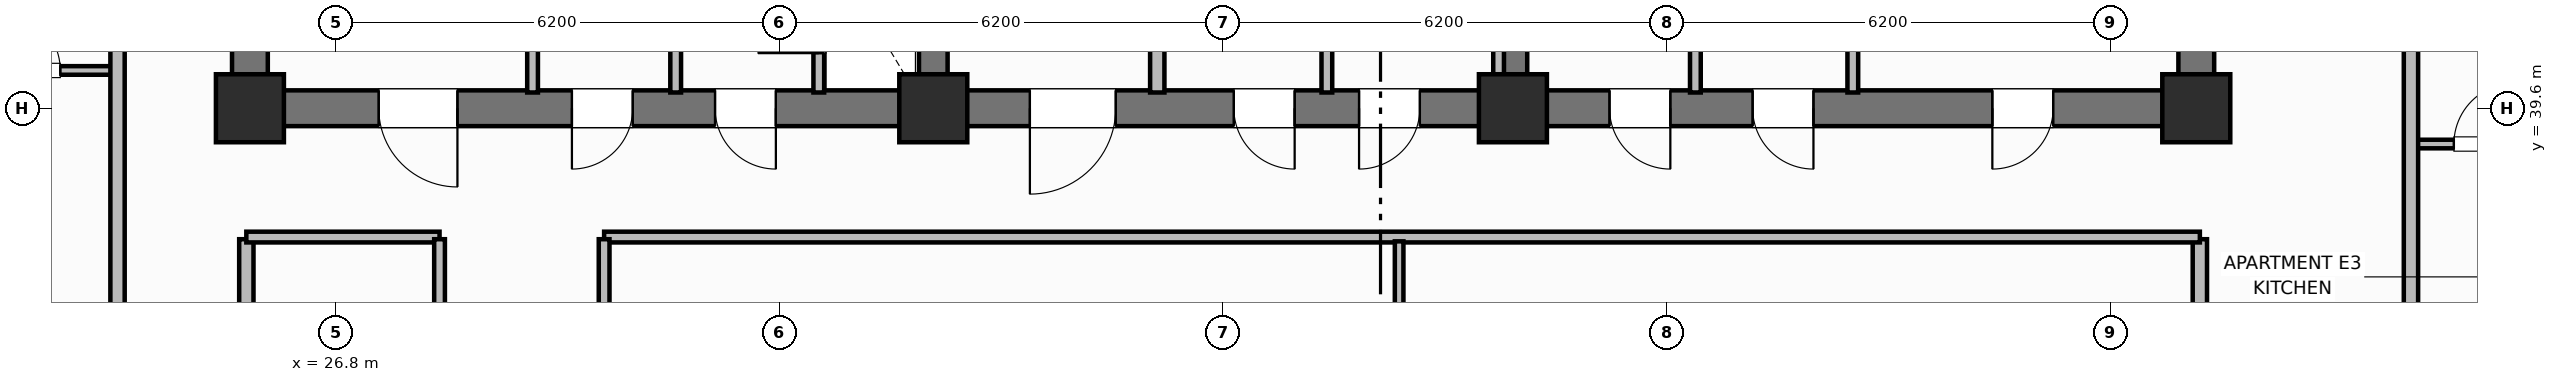
"""IFC4 building model, lengths in metres.
Left out: names, types, materials, properties, quantities, classifications, styles, units other than length and angle.
Written with IfcOpenShell. Run it as: python <this file> out.ifc"""

import sys

from ifc_helpers import new_model, si_unit, direction, frame, frame_2d, origin, origin_2d, place, context, subcontext, project, spatial, rectangle, extrude, element, fill, save


model = new_model("IFC4")
c1 = context("Model", 3, precision=1e-05, world=origin(), true_north=direction((0.0, 1.0)))
c2 = subcontext(c1, "Body", "Model", "MODEL_VIEW")
j1 = project(units=[si_unit("LENGTHUNIT", "METRE"), si_unit("PLANEANGLEUNIT", "RADIAN")], contexts=[c1])
p1 = place(None, origin())
s1 = spatial("IfcSite", under=j1, at=p1, CompositionType="ELEMENT")
p2 = place(p1, origin())
s2 = spatial("IfcBuilding", under=s1, at=p2, CompositionType="ELEMENT")
p3 = place(p2, frame((0.0, 0.0, 192.2)))
s3 = spatial("IfcBuildingStorey", under=s2, at=p3, CompositionType="ELEMENT", Elevation=192.2)
for number, where, z_axis, x_axis in (
    (1, (25.6, 39.85, 0.0), (0.0, 0.0, 1.0), (0.0, 1.0, 0.0)),
    (2, (52.8, 39.85, 0.0), (0.0, 0.0, 1.0), (0.0, 1.0, 0.0)),
):
    element("IfcWall", number, at=place(p3, frame(where, z_axis=z_axis, x_axis=x_axis)), inside=s3, PredefinedType="SHEAR", context=c2, shape_type="SweptSolid", body=[
        extrude(rectangle(XDim=5.7, YDim=0.5, at=frame_2d((2.85, 0.0))), origin(), (0.0, 0.0, 1.0), 3.7),
    ])
p4 = place(p3, frame((52.8, 39.6, 0.0), z_axis=(0.0, 0.0, 1.0), x_axis=(-1.0, 0.0, 0.0)))
e3 = element("IfcWall", 3, at=p4, inside=s3, PredefinedType="SHEAR", context=c2, shape_type="SweptSolid", body=[
    extrude(rectangle(XDim=27.2, YDim=0.5, at=frame_2d((13.6, 0.0))), origin(), (0.0, 0.0, 1.0), 3.7),
])
p5 = place(p4, frame((24.3, 0.0, 0.0)))
e4 = element("IfcOpeningElement", 4, at=p5, cuts=e3, PredefinedType="OPENING", context=c2, shape_type="SweptSolid", body=[
    extrude(rectangle(XDim=1.1, YDim=2.15, at=frame_2d((0.55, 1.075))), frame((0.0, 0.26, 0.0), z_axis=(0.0, -1.0, 0.0), x_axis=(1.0, 0.0, 0.0)), (0.0, 0.0, 1.0), 0.52),
])
p6 = place(p4, frame((21.85, 0.0, 0.0)))
e5 = element("IfcOpeningElement", 5, at=p6, cuts=e3, PredefinedType="OPENING", context=c2, shape_type="SweptSolid", body=[
    extrude(rectangle(XDim=0.85, YDim=2.1, at=frame_2d((0.425, 1.05))), frame((0.0, 0.26, 0.0), z_axis=(0.0, -1.0, 0.0), x_axis=(1.0, 0.0, 0.0)), (0.0, 0.0, 1.0), 0.52),
])
p7 = place(p4, frame((19.85, 0.0, 0.0)))
e6 = element("IfcOpeningElement", 6, at=p7, cuts=e3, PredefinedType="OPENING", context=c2, shape_type="SweptSolid", body=[
    extrude(rectangle(XDim=0.85, YDim=2.1, at=frame_2d((0.425, 1.05))), frame((0.0, 0.26, 0.0), z_axis=(0.0, -1.0, 0.0), x_axis=(1.0, 0.0, 0.0)), (0.0, 0.0, 1.0), 0.52),
])
p8 = place(p4, frame((15.1, 0.0, 0.0)))
e7 = element("IfcOpeningElement", 7, at=p8, cuts=e3, PredefinedType="OPENING", context=c2, shape_type="SweptSolid", body=[
    extrude(rectangle(XDim=1.2, YDim=2.15, at=frame_2d((0.6, 1.075))), frame((0.0, 0.26, 0.0), z_axis=(0.0, -1.0, 0.0), x_axis=(1.0, 0.0, 0.0)), (0.0, 0.0, 1.0), 0.52),
])
p9 = place(p4, frame((12.6, 0.0, 0.0)))
e8 = element("IfcOpeningElement", 8, at=p9, cuts=e3, PredefinedType="OPENING", context=c2, shape_type="SweptSolid", body=[
    extrude(rectangle(XDim=0.85, YDim=2.1, at=frame_2d((0.425, 1.05))), frame((0.0, 0.26, 0.0), z_axis=(0.0, -1.0, 0.0), x_axis=(1.0, 0.0, 0.0)), (0.0, 0.0, 1.0), 0.52),
])
p10 = place(p4, frame((10.85, 0.0, 0.0)))
e9 = element("IfcOpeningElement", 9, at=p10, cuts=e3, PredefinedType="OPENING", context=c2, shape_type="SweptSolid", body=[
    extrude(rectangle(XDim=0.85, YDim=2.1, at=frame_2d((0.425, 1.05))), frame((0.0, 0.26, 0.0), z_axis=(0.0, -1.0, 0.0), x_axis=(1.0, 0.0, 0.0)), (0.0, 0.0, 1.0), 0.52),
])
p11 = place(p4, frame((7.35, 0.0, 0.0)))
e10 = element("IfcOpeningElement", 10, at=p11, cuts=e3, PredefinedType="OPENING", context=c2, shape_type="SweptSolid", body=[
    extrude(rectangle(XDim=0.85, YDim=2.1, at=frame_2d((0.425, 1.05))), frame((0.0, 0.26, 0.0), z_axis=(0.0, -1.0, 0.0), x_axis=(1.0, 0.0, 0.0)), (0.0, 0.0, 1.0), 0.52),
])
p12 = place(p4, frame((5.35, 0.0, 0.0)))
e11 = element("IfcOpeningElement", 11, at=p12, cuts=e3, PredefinedType="OPENING", context=c2, shape_type="SweptSolid", body=[
    extrude(rectangle(XDim=0.85, YDim=2.1, at=frame_2d((0.425, 1.05))), frame((0.0, 0.26, 0.0), z_axis=(0.0, -1.0, 0.0), x_axis=(1.0, 0.0, 0.0)), (0.0, 0.0, 1.0), 0.52),
])
p13 = place(p4, frame((2.0, 0.0, 0.0)))
e12 = element("IfcOpeningElement", 12, at=p13, cuts=e3, PredefinedType="OPENING", context=c2, shape_type="SweptSolid", body=[
    extrude(rectangle(XDim=0.85, YDim=2.1, at=frame_2d((0.425, 1.05))), frame((0.0, 0.26, 0.0), z_axis=(0.0, -1.0, 0.0), x_axis=(1.0, 0.0, 0.0)), (0.0, 0.0, 1.0), 0.52),
])
for number, where, z_axis, x_axis in (
    (13, (35.15, 39.85, 0.0), (0.0, 0.0, 1.0), (0.0, 1.0, 0.0)),
    (14, (43.25, 39.85, 0.0), (0.0, 0.0, 1.0), (0.0, 1.0, 0.0)),
):
    element("IfcWall", number, at=place(p3, frame(where, z_axis=z_axis, x_axis=x_axis)), inside=s3, PredefinedType="SHEAR", context=c2, shape_type="SweptSolid", body=[
        extrude(rectangle(XDim=5.7, YDim=0.4, at=frame_2d((2.85, 0.0))), origin(), (0.0, 0.0, 1.0), 3.7),
    ])
for number, where, z_axis, x_axis in (
    (15, (25.6, 39.6, 0.0), (0.0, 0.0, 1.0), (1.0, 0.0, 0.0)),
    (16, (35.15, 39.6, 0.0), (0.0, 0.0, 1.0), (1.0, 0.0, 0.0)),
    (17, (43.25, 39.6, 0.0), (0.0, 0.0, 1.0), (1.0, 0.0, 0.0)),
    (18, (52.8, 39.6, 0.0), (0.0, 0.0, 1.0), (1.0, 0.0, 0.0)),
):
    element("IfcColumn", number, at=place(p3, frame(where, z_axis=z_axis, x_axis=x_axis)), inside=s3, PredefinedType="COLUMN", context=c2, shape_type="SweptSolid", body=[
        extrude(rectangle(XDim=0.95, YDim=0.95, at=origin_2d()), origin(), (0.0, 0.0, 1.0), 3.7),
    ])
p14 = place(p3, frame((33.55, 39.82, 0.0), z_axis=(0.0, 0.0, 1.0), x_axis=(0.0, 1.0, 0.0)))
e19 = element("IfcWall", 19, at=p14, inside=s3, PredefinedType="PARTITIONING", context=c2, shape_type="SweptSolid", body=[
    extrude(rectangle(XDim=2.13, YDim=0.15, at=frame_2d((1.065, 0.0))), origin(), (0.0, 0.0, 1.0), 2.49),
])
p15 = place(p14, frame((0.55, 0.0, 0.0)))
e20 = element("IfcOpeningElement", 20, at=p15, cuts=e19, PredefinedType="OPENING", context=c2, shape_type="SweptSolid", body=[
    extrude(rectangle(XDim=0.85, YDim=2.05, at=frame_2d((0.425, 1.025))), frame((0.0, 0.085, 0.0), z_axis=(0.0, -1.0, 0.0), x_axis=(1.0, 0.0, 0.0)), (0.0, 0.0, 1.0), 0.17),
])
for number, where, z_axis, x_axis in (
    (21, (29.55, 39.82, 0.0), (0.0, 0.0, 1.0), (0.0, 1.0, 0.0)),
    (22, (31.55, 39.82, 0.0), (0.0, 0.0, 1.0), (0.0, 1.0, 0.0)),
):
    element("IfcWall", number, at=place(p3, frame(where, z_axis=z_axis, x_axis=x_axis)), inside=s3, PredefinedType="PARTITIONING", context=c2, shape_type="SweptSolid", body=[
        extrude(rectangle(XDim=2.13, YDim=0.15, at=frame_2d((1.065, 0.0))), origin(), (0.0, 0.0, 1.0), 2.49),
    ])
p16 = place(p3, frame((38.28, 39.82, 0.0), z_axis=(0.0, 0.0, 1.0), x_axis=(0.0, 1.0, 0.0)))
e23 = element("IfcWall", 23, at=p16, inside=s3, PredefinedType="PARTITIONING", context=c2, shape_type="SweptSolid", body=[
    extrude(rectangle(XDim=5.63, YDim=0.2, at=frame_2d((2.815, 0.0))), origin(), (0.0, 0.0, 1.0), 2.49),
])
for number, where, z_axis, x_axis in (
    (24, (43.05, 39.82, 0.0), (0.0, 0.0, 1.0), (0.0, 1.0, 0.0)),
    (25, (40.65, 39.82, 0.0), (0.0, 0.0, 1.0), (0.0, 1.0, 0.0)),
    (26, (45.8, 39.82, 0.0), (0.0, 0.0, 1.0), (0.0, 1.0, 0.0)),
):
    element("IfcWall", number, at=place(p3, frame(where, z_axis=z_axis, x_axis=x_axis)), inside=s3, PredefinedType="PARTITIONING", context=c2, shape_type="SweptSolid", body=[
        extrude(rectangle(XDim=5.63, YDim=0.15, at=frame_2d((2.815, 0.0))), origin(), (0.0, 0.0, 1.0), 2.49),
    ])
p17 = place(p3, frame((48.0, 39.82, 0.0), z_axis=(0.0, 0.0, 1.0), x_axis=(0.0, 1.0, 0.0)))
e27 = element("IfcWall", 27, at=p17, inside=s3, PredefinedType="PARTITIONING", context=c2, shape_type="SweptSolid", body=[
    extrude(rectangle(XDim=2.73, YDim=0.15, at=frame_2d((1.365, 0.0))), origin(), (0.0, 0.0, 1.0), 2.49),
])
for number, where, z_axis, x_axis in (
    (28, (25.55, 18.63, 0.0), (0.0, 0.0, 1.0), (0.0, 1.0, 0.0)),
    (29, (52.85, 18.63, 0.0), (0.0, 0.0, 1.0), (0.0, 1.0, 0.0)),
):
    element("IfcWall", number, at=place(p3, frame(where, z_axis=z_axis, x_axis=x_axis)), inside=s3, PredefinedType="PARTITIONING", context=c2, shape_type="SweptSolid", body=[
        extrude(rectangle(XDim=19.14, YDim=0.2, at=frame_2d((9.57, 0.0))), origin(), (0.0, 0.0, 1.0), 2.49),
    ])
p18 = place(p3, frame((25.55, 37.8, 0.0), z_axis=(0.0, 0.0, 1.0), x_axis=(1.0, 0.0, 0.0)))
e30 = element("IfcWall", 30, at=p18, inside=s3, PredefinedType="PARTITIONING", context=c2, shape_type="SweptSolid", body=[
    extrude(rectangle(XDim=2.7, YDim=0.15, at=frame_2d((1.35, 0.0))), origin(), (0.0, 0.0, 1.0), 2.49),
])
p19 = place(p3, frame((30.55, 37.8, 0.0), z_axis=(0.0, 0.0, 1.0), x_axis=(1.0, 0.0, 0.0)))
e31 = element("IfcWall", 31, at=p19, inside=s3, PredefinedType="PARTITIONING", context=c2, shape_type="SweptSolid", body=[
    extrude(rectangle(XDim=22.3, YDim=0.15, at=frame_2d((11.15, 0.0))), origin(), (0.0, 0.0, 1.0), 2.49),
])
p20 = place(p3, frame((41.66, 25.56, 0.0), z_axis=(0.0, 0.0, 1.0), x_axis=(0.0, 1.0, 0.0)))
e32 = element("IfcWall", 32, at=p20, inside=s3, PredefinedType="PARTITIONING", context=c2, shape_type="SweptSolid", body=[
    extrude(rectangle(XDim=12.18, YDim=0.12, at=frame_2d((6.09, 0.0))), origin(), (0.0, 0.0, 1.0), 2.49),
])
p21 = place(p20, frame((2.0, 0.0, 0.0)))
e33 = element("IfcOpeningElement", 33, at=p21, cuts=e32, PredefinedType="OPENING", context=c2, shape_type="SweptSolid", body=[
    extrude(rectangle(XDim=0.9, YDim=2.1, at=frame_2d((0.45, 1.05))), frame((0.0, 0.07, 0.0), z_axis=(0.0, -1.0, 0.0), x_axis=(1.0, 0.0, 0.0)), (0.0, 0.0, 1.0), 0.14),
])
p22 = place(p3, frame((28.25, 18.63, 0.0), z_axis=(0.0, 0.0, 1.0), x_axis=(0.0, 1.0, 0.0)))
e34 = element("IfcWall", 34, at=p22, inside=s3, PredefinedType="PARTITIONING", context=c2, shape_type="SweptSolid", body=[
    extrude(rectangle(XDim=19.14, YDim=0.15, at=frame_2d((9.57, 0.0))), origin(), (0.0, 0.0, 1.0), 2.49),
])
p23 = place(p22, frame((3.0, 0.0, 0.0)))
e35 = element("IfcOpeningElement", 35, at=p23, cuts=e34, PredefinedType="OPENING", context=c2, shape_type="SweptSolid", body=[
    extrude(rectangle(XDim=0.9, YDim=2.1, at=frame_2d((0.45, 1.05))), frame((0.0, 0.085, 0.0), z_axis=(0.0, -1.0, 0.0), x_axis=(1.0, 0.0, 0.0)), (0.0, 0.0, 1.0), 0.17),
])
p24 = place(p22, frame((11.5, 0.0, 0.0)))
e36 = element("IfcOpeningElement", 36, at=p24, cuts=e34, PredefinedType="OPENING", context=c2, shape_type="SweptSolid", body=[
    extrude(rectangle(XDim=0.9, YDim=2.1, at=frame_2d((0.45, 1.05))), frame((0.0, 0.085, 0.0), z_axis=(0.0, -1.0, 0.0), x_axis=(1.0, 0.0, 0.0)), (0.0, 0.0, 1.0), 0.17),
])
p25 = place(p3, frame((30.55, 18.63, 0.0), z_axis=(0.0, 0.0, 1.0), x_axis=(0.0, 1.0, 0.0)))
e37 = element("IfcWall", 37, at=p25, inside=s3, PredefinedType="PARTITIONING", context=c2, shape_type="SweptSolid", body=[
    extrude(rectangle(XDim=19.14, YDim=0.15, at=frame_2d((9.57, 0.0))), origin(), (0.0, 0.0, 1.0), 2.49),
])
p26 = place(p25, frame((2.2, 0.0, 0.0)))
e38 = element("IfcOpeningElement", 38, at=p26, cuts=e37, PredefinedType="OPENING", context=c2, shape_type="SweptSolid", body=[
    extrude(rectangle(XDim=1.0, YDim=2.15, at=frame_2d((0.5, 1.075))), frame((0.0, 0.085, 0.0), z_axis=(0.0, -1.0, 0.0), x_axis=(1.0, 0.0, 0.0)), (0.0, 0.0, 1.0), 0.17),
])
p27 = place(p25, frame((8.89, 0.0, 0.0)))
e39 = element("IfcOpeningElement", 39, at=p27, cuts=e37, PredefinedType="OPENING", context=c2, shape_type="SweptSolid", body=[
    extrude(rectangle(XDim=1.0, YDim=2.15, at=frame_2d((0.5, 1.075))), frame((0.0, 0.085, 0.0), z_axis=(0.0, -1.0, 0.0), x_axis=(1.0, 0.0, 0.0)), (0.0, 0.0, 1.0), 0.17),
])
p28 = place(p3, frame((21.5, 40.128, 0.0), z_axis=(0.0, 0.0, 1.0), x_axis=(1.0, 0.0, 0.0)))
e40 = element("IfcWall", 40, at=p28, inside=s3, PredefinedType="PARTITIONING", context=c2, shape_type="SweptSolid", body=[
    extrude(rectangle(XDim=2.25, YDim=0.12, at=frame_2d((1.125, 0.0))), origin(), (0.0, 0.0, 1.0), 2.49),
])
p29 = place(p28, frame((0.6, 0.0, 0.0)))
e41 = element("IfcOpeningElement", 41, at=p29, cuts=e40, PredefinedType="OPENING", context=c2, shape_type="SweptSolid", body=[
    extrude(rectangle(XDim=0.85, YDim=2.1, at=frame_2d((0.425, 1.05))), frame((0.0, 0.07, 0.0), z_axis=(0.0, -1.0, 0.0), x_axis=(1.0, 0.0, 0.0)), (0.0, 0.0, 1.0), 0.14),
])
p30 = place(p3, frame((23.75, 10.6, 0.0), z_axis=(0.0, 0.0, 1.0), x_axis=(0.0, 1.0, 0.0)))
e42 = element("IfcWall", 42, at=p30, inside=s3, PredefinedType="PARTITIONING", context=c2, shape_type="SweptSolid", body=[
    extrude(rectangle(XDim=35.2, YDim=0.2, at=frame_2d((17.6, 0.0))), origin(), (0.0, 0.0, 1.0), 2.49),
])
p31 = place(p30, frame((2.65, 0.0, 0.0)))
e43 = element("IfcOpeningElement", 43, at=p31, cuts=e42, PredefinedType="OPENING", context=c2, shape_type="SweptSolid", body=[
    extrude(rectangle(XDim=1.0, YDim=2.15, at=frame_2d((0.5, 1.075))), frame((0.0, 0.11, 0.0), z_axis=(0.0, -1.0, 0.0), x_axis=(1.0, 0.0, 0.0)), (0.0, 0.0, 1.0), 0.22),
])
p32 = place(p30, frame((13.222, 0.0, 0.0)))
e44 = element("IfcOpeningElement", 44, at=p32, cuts=e42, PredefinedType="OPENING", context=c2, shape_type="SweptSolid", body=[
    extrude(rectangle(XDim=1.0, YDim=2.15, at=frame_2d((0.5, 1.075))), frame((0.0, 0.11, 0.0), z_axis=(0.0, -1.0, 0.0), x_axis=(1.0, 0.0, 0.0)), (0.0, 0.0, 1.0), 0.22),
])
p33 = place(p30, frame((24.838, 0.0, 0.0)))
e45 = element("IfcOpeningElement", 45, at=p33, cuts=e42, PredefinedType="OPENING", context=c2, shape_type="SweptSolid", body=[
    extrude(rectangle(XDim=1.0, YDim=2.15, at=frame_2d((0.5, 1.075))), frame((0.0, 0.11, 0.0), z_axis=(0.0, -1.0, 0.0), x_axis=(1.0, 0.0, 0.0)), (0.0, 0.0, 1.0), 0.22),
])
p34 = place(p3, frame((55.8, 39.1, 0.0), z_axis=(0.0, 0.0, 1.0), x_axis=(1.0, 0.0, 0.0)))
e46 = element("IfcWall", 46, at=p34, inside=s3, PredefinedType="PARTITIONING", context=c2, shape_type="SweptSolid", body=[
    extrude(rectangle(XDim=2.25, YDim=0.12, at=frame_2d((1.125, 0.0))), origin(), (0.0, 0.0, 1.0), 2.49),
])
p35 = place(p34, frame((0.6, 0.0, 0.0)))
e47 = element("IfcOpeningElement", 47, at=p35, cuts=e46, PredefinedType="OPENING", context=c2, shape_type="SweptSolid", body=[
    extrude(rectangle(XDim=0.85, YDim=2.1, at=frame_2d((0.425, 1.05))), frame((0.0, 0.07, 0.0), z_axis=(0.0, -1.0, 0.0), x_axis=(1.0, 0.0, 0.0)), (0.0, 0.0, 1.0), 0.14),
])
p36 = place(p3, frame((55.8, 10.6, 0.0), z_axis=(0.0, 0.0, 1.0), x_axis=(0.0, 1.0, 0.0)))
e48 = element("IfcWall", 48, at=p36, inside=s3, PredefinedType="PARTITIONING", context=c2, shape_type="SweptSolid", body=[
    extrude(rectangle(XDim=35.2, YDim=0.2, at=frame_2d((17.6, 0.0))), origin(), (0.0, 0.0, 1.0), 2.49),
])
p37 = place(p36, frame((2.65, 0.0, 0.0)))
e49 = element("IfcOpeningElement", 49, at=p37, cuts=e48, PredefinedType="OPENING", context=c2, shape_type="SweptSolid", body=[
    extrude(rectangle(XDim=1.0, YDim=2.15, at=frame_2d((0.5, 1.075))), frame((0.0, 0.11, 0.0), z_axis=(0.0, -1.0, 0.0), x_axis=(1.0, 0.0, 0.0)), (0.0, 0.0, 1.0), 0.22),
])
p38 = place(p36, frame((12.87, 0.0, 0.0)))
e50 = element("IfcOpeningElement", 50, at=p38, cuts=e48, PredefinedType="OPENING", context=c2, shape_type="SweptSolid", body=[
    extrude(rectangle(XDim=1.0, YDim=2.15, at=frame_2d((0.5, 1.075))), frame((0.0, 0.11, 0.0), z_axis=(0.0, -1.0, 0.0), x_axis=(1.0, 0.0, 0.0)), (0.0, 0.0, 1.0), 0.22),
])
p39 = place(p36, frame((23.65, 0.0, 0.0)))
e51 = element("IfcOpeningElement", 51, at=p39, cuts=e48, PredefinedType="OPENING", context=c2, shape_type="SweptSolid", body=[
    extrude(rectangle(XDim=1.0, YDim=2.15, at=frame_2d((0.5, 1.075))), frame((0.0, 0.11, 0.0), z_axis=(0.0, -1.0, 0.0), x_axis=(1.0, 0.0, 0.0)), (0.0, 0.0, 1.0), 0.22),
])
p40 = place(p15, origin())
e52 = element("IfcDoor", 52, at=p40, inside=s3, OperationType="SINGLE_SWING_LEFT", PredefinedType="TRAPDOOR", context=c2, shape_type="SweptSolid", body=[
    extrude(rectangle(XDim=0.85, YDim=2.05, at=frame_2d((0.425, 1.025))), frame((0.0, 0.025, 0.0), z_axis=(0.0, -1.0, 0.0), x_axis=(1.0, 0.0, 0.0)), (0.0, 0.0, 1.0), 0.05),
])
fill(e20, e52)
p41 = place(p29, origin())
e53 = element("IfcDoor", 53, at=p41, inside=s3, OperationType="SINGLE_SWING_LEFT", PredefinedType="DOOR", context=c2, shape_type="SweptSolid", body=[
    extrude(rectangle(XDim=0.85, YDim=2.1, at=frame_2d((0.425, 1.05))), frame((0.0, 0.025, 0.0), z_axis=(0.0, -1.0, 0.0), x_axis=(1.0, 0.0, 0.0)), (0.0, 0.0, 1.0), 0.05),
])
fill(e41, e53)
p42 = place(p35, origin())
e54 = element("IfcDoor", 54, at=p42, inside=s3, OperationType="SINGLE_SWING_RIGHT", PredefinedType="DOOR", context=c2, shape_type="SweptSolid", body=[
    extrude(rectangle(XDim=0.85, YDim=2.1, at=frame_2d((0.425, 1.05))), frame((0.0, 0.025, 0.0), z_axis=(0.0, -1.0, 0.0), x_axis=(1.0, 0.0, 0.0)), (0.0, 0.0, 1.0), 0.05),
])
fill(e47, e54)
p43 = place(p5, origin())
e55 = element("IfcDoor", 55, at=p43, inside=s3, OperationType="SINGLE_SWING_LEFT", PredefinedType="DOOR", context=c2, shape_type="SweptSolid", body=[
    extrude(rectangle(XDim=1.1, YDim=2.15, at=frame_2d((0.55, 1.075))), frame((0.0, 0.025, 0.0), z_axis=(0.0, -1.0, 0.0), x_axis=(1.0, 0.0, 0.0)), (0.0, 0.0, 1.0), 0.05),
])
fill(e4, e55)
p44 = place(p6, origin())
e56 = element("IfcDoor", 56, at=p44, inside=s3, OperationType="SINGLE_SWING_RIGHT", PredefinedType="DOOR", context=c2, shape_type="SweptSolid", body=[
    extrude(rectangle(XDim=0.85, YDim=2.1, at=frame_2d((0.425, 1.05))), frame((0.0, 0.025, 0.0), z_axis=(0.0, -1.0, 0.0), x_axis=(1.0, 0.0, 0.0)), (0.0, 0.0, 1.0), 0.05),
])
fill(e5, e56)
p45 = place(p7, origin())
e57 = element("IfcDoor", 57, at=p45, inside=s3, OperationType="SINGLE_SWING_LEFT", PredefinedType="DOOR", context=c2, shape_type="SweptSolid", body=[
    extrude(rectangle(XDim=0.85, YDim=2.1, at=frame_2d((0.425, 1.05))), frame((0.0, 0.025, 0.0), z_axis=(0.0, -1.0, 0.0), x_axis=(1.0, 0.0, 0.0)), (0.0, 0.0, 1.0), 0.05),
])
fill(e6, e57)
p46 = place(p8, origin())
e58 = element("IfcDoor", 58, at=p46, inside=s3, OperationType="SINGLE_SWING_RIGHT", PredefinedType="DOOR", context=c2, shape_type="SweptSolid", body=[
    extrude(rectangle(XDim=1.2, YDim=2.15, at=frame_2d((0.6, 1.075))), frame((0.0, 0.025, 0.0), z_axis=(0.0, -1.0, 0.0), x_axis=(1.0, 0.0, 0.0)), (0.0, 0.0, 1.0), 0.05),
])
fill(e7, e58)
p47 = place(p9, origin())
e59 = element("IfcDoor", 59, at=p47, inside=s3, OperationType="SINGLE_SWING_LEFT", PredefinedType="DOOR", context=c2, shape_type="SweptSolid", body=[
    extrude(rectangle(XDim=0.85, YDim=2.1, at=frame_2d((0.425, 1.05))), frame((0.0, 0.025, 0.0), z_axis=(0.0, -1.0, 0.0), x_axis=(1.0, 0.0, 0.0)), (0.0, 0.0, 1.0), 0.05),
])
fill(e8, e59)
p48 = place(p10, origin())
e60 = element("IfcDoor", 60, at=p48, inside=s3, OperationType="SINGLE_SWING_RIGHT", PredefinedType="DOOR", context=c2, shape_type="SweptSolid", body=[
    extrude(rectangle(XDim=0.85, YDim=2.1, at=frame_2d((0.425, 1.05))), frame((0.0, 0.025, 0.0), z_axis=(0.0, -1.0, 0.0), x_axis=(1.0, 0.0, 0.0)), (0.0, 0.0, 1.0), 0.05),
])
fill(e9, e60)
p49 = place(p11, origin())
e61 = element("IfcDoor", 61, at=p49, inside=s3, OperationType="SINGLE_SWING_LEFT", PredefinedType="DOOR", context=c2, shape_type="SweptSolid", body=[
    extrude(rectangle(XDim=0.85, YDim=2.1, at=frame_2d((0.425, 1.05))), frame((0.0, 0.025, 0.0), z_axis=(0.0, -1.0, 0.0), x_axis=(1.0, 0.0, 0.0)), (0.0, 0.0, 1.0), 0.05),
])
fill(e10, e61)
p50 = place(p12, origin())
e62 = element("IfcDoor", 62, at=p50, inside=s3, OperationType="SINGLE_SWING_LEFT", PredefinedType="DOOR", context=c2, shape_type="SweptSolid", body=[
    extrude(rectangle(XDim=0.85, YDim=2.1, at=frame_2d((0.425, 1.05))), frame((0.0, 0.025, 0.0), z_axis=(0.0, -1.0, 0.0), x_axis=(1.0, 0.0, 0.0)), (0.0, 0.0, 1.0), 0.05),
])
fill(e11, e62)
p51 = place(p13, origin())
e63 = element("IfcDoor", 63, at=p51, inside=s3, OperationType="SINGLE_SWING_RIGHT", PredefinedType="DOOR", context=c2, shape_type="SweptSolid", body=[
    extrude(rectangle(XDim=0.85, YDim=2.1, at=frame_2d((0.425, 1.05))), frame((0.0, 0.025, 0.0), z_axis=(0.0, -1.0, 0.0), x_axis=(1.0, 0.0, 0.0)), (0.0, 0.0, 1.0), 0.05),
])
fill(e12, e63)
save(model, sys.argv[1])
